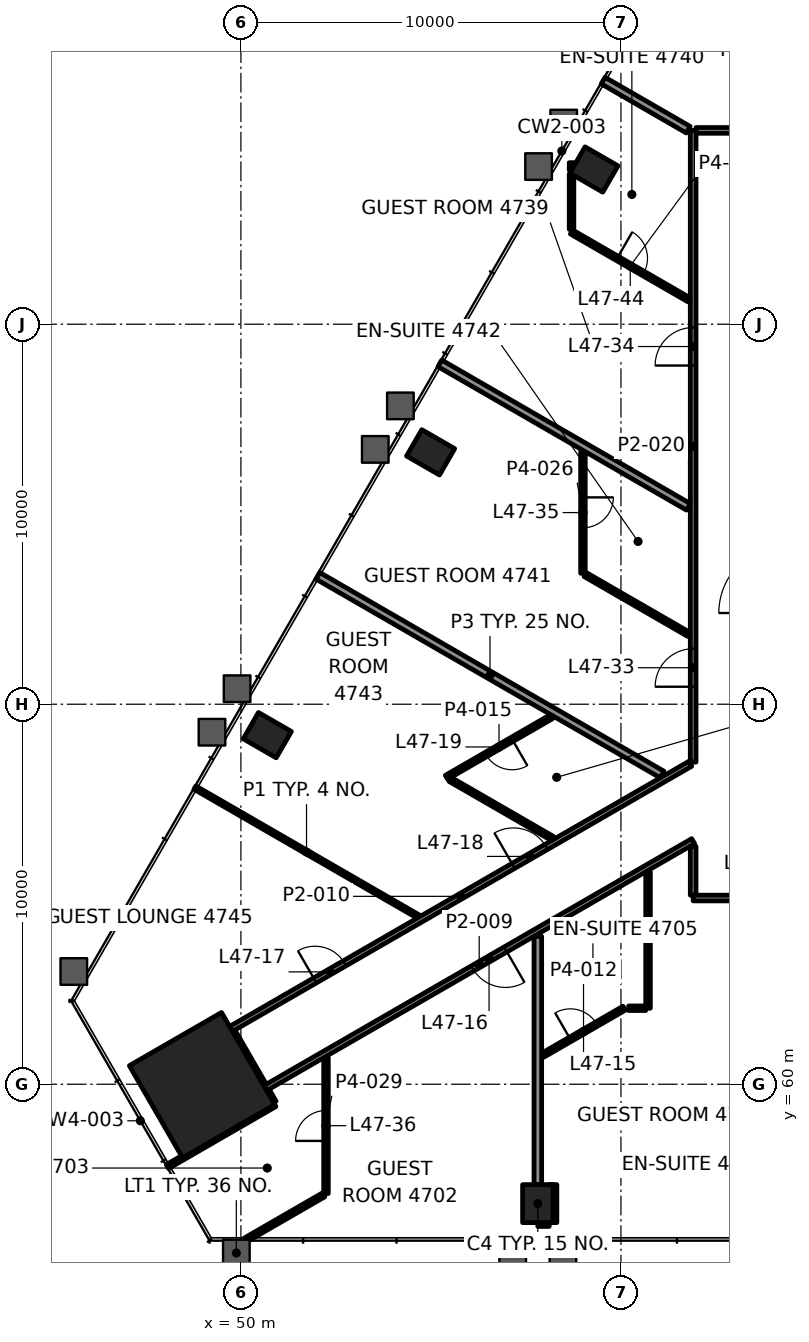
"""IFC4 building model, lengths in metres.
Left out: names, types, materials, properties, quantities, classifications, styles, units other than length and angle.
Written with IfcOpenShell. Run it as: python <this file> out.ifc"""

import sys

from ifc_helpers import new_model, si_unit, direction, frame, frame_2d, origin, origin_2d, place, context, subcontext, project, spatial, rectangle, hollow_rectangle, extrude, element, fill, save


model = new_model("IFC4")
c1 = context("Model", 3, precision=1e-05, world=origin(), true_north=direction((0.0, 1.0)))
c2 = subcontext(c1, "Body", "Model", "MODEL_VIEW")
j1 = project(units=[si_unit("LENGTHUNIT", "METRE"), si_unit("PLANEANGLEUNIT", "RADIAN")], contexts=[c1])
p1 = place(None, origin())
s1 = spatial("IfcSite", under=j1, at=p1, CompositionType="ELEMENT")
p2 = place(p1, origin())
s2 = spatial("IfcBuilding", under=s1, at=p2, CompositionType="ELEMENT")
p3 = place(p2, frame((0.0, 0.0, 202.6)))
s3 = spatial("IfcBuildingStorey", under=s2, at=p3, CompositionType="ELEMENT", Elevation=202.6)
p4 = place(p3, frame((48.978, 59.976, 0.0), z_axis=(0.0, 0.0, 1.0), x_axis=(0.5, -0.866025403784, 0.0)))
e1 = element("IfcColumn", 1, at=p4, inside=s3, PredefinedType="COLUMN", context=c2, shape_type="SweptSolid", body=[
    extrude(rectangle(XDim=2.8, YDim=2.8, at=origin_2d()), origin(), (0.0, 0.0, 1.0), 3.9),
])
for number, where, z_axis, x_axis in (
    (2, (57.812, 56.858, -0.0), (0.0, 0.0, 1.0), (1.0, 0.0, 0.0)),
    (3, (59.289, 84.071, -0.0), (0.0, 0.0, 1.0), (-0.5, -0.866, 0.0)),
    (4, (54.992, 76.628, -0.0), (0.0, 0.0, 1.0), (-0.5, -0.866, 0.0)),
    (5, (50.695, 69.186, -0.0), (0.0, 0.0, 1.0), (-0.5, -0.866, 0.0)),
):
    element("IfcColumn", number, at=place(p3, frame(where, z_axis=z_axis, x_axis=x_axis)), inside=s3, PredefinedType="COLUMN", context=c2, shape_type="SweptSolid", body=[
        extrude(hollow_rectangle(XDim=0.8, YDim=1.0, WallThickness=0.05, at=origin_2d()), origin(), (0.0, 0.0, 1.0), 3.9),
    ])
p5 = place(p3, frame((57.812, 56.358, 0.0), z_axis=(0.0, 0.0, 1.0), x_axis=(1.0, 0.0, 0.0)))
e6 = element("IfcWall", 6, at=p5, inside=s3, PredefinedType="PARTITIONING", context=c2, shape_type="SweptSolid", body=[
    extrude(rectangle(XDim=0.3, YDim=0.2, at=frame_2d((0.15, 0.0))), origin(), (0.0, 0.0, 1.0), 3.1),
])
p6 = place(p3, frame((60.203, 62.0, 0.0), z_axis=(0.0, 0.0, 1.0), x_axis=(1.0, 0.0, 0.0)))
e7 = element("IfcWall", 7, at=p6, inside=s3, PredefinedType="PARTITIONING", context=c2, shape_type="SweptSolid", body=[
    extrude(rectangle(XDim=0.449, YDim=0.12, at=frame_2d((0.225, 0.0))), origin(), (0.0, 0.0, 1.0), 3.1),
])
p7 = place(p3, frame((88.1, 64.9, 0.0), z_axis=(0.0, 0.0, 1.0), x_axis=(-1.0, 0.0, 0.0)))
e8 = element("IfcWall", 8, at=p7, inside=s3, PredefinedType="PARTITIONING", context=c2, shape_type="SweptSolid", body=[
    extrude(rectangle(XDim=26.2, YDim=0.15, at=frame_2d((13.1, 0.0))), origin(), (0.0, 0.0, 1.0), 3.1),
])
p8 = place(p7, frame((7.443, 0.0, 0.0)))
e9 = element("IfcOpeningElement", 9, at=p8, cuts=e8, PredefinedType="OPENING", context=c2, shape_type="SweptSolid", body=[
    extrude(rectangle(XDim=1.0, YDim=2.1, at=frame_2d((0.5, 1.05))), frame((0.0, 0.085, 0.0), z_axis=(0.0, -1.0, 0.0), x_axis=(1.0, 0.0, 0.0)), (0.0, 0.0, 1.0), 0.17),
])
p9 = place(p7, frame((16.037, 0.0, 0.0)))
e10 = element("IfcOpeningElement", 10, at=p9, cuts=e8, PredefinedType="OPENING", context=c2, shape_type="SweptSolid", body=[
    extrude(rectangle(XDim=1.0, YDim=2.1, at=frame_2d((0.5, 1.05))), frame((0.0, 0.085, 0.0), z_axis=(0.0, -1.0, 0.0), x_axis=(1.0, 0.0, 0.0)), (0.0, 0.0, 1.0), 0.17),
])
p10 = place(p7, frame((19.747, 0.0, 0.0)))
e11 = element("IfcOpeningElement", 11, at=p10, cuts=e8, PredefinedType="OPENING", context=c2, shape_type="SweptSolid", body=[
    extrude(rectangle(XDim=1.0, YDim=2.1, at=frame_2d((0.5, 1.05))), frame((0.0, 0.085, 0.0), z_axis=(0.0, -1.0, 0.0), x_axis=(1.0, 0.0, 0.0)), (0.0, 0.0, 1.0), 0.17),
])
p11 = place(p7, frame((24.013, 0.0, 0.0)))
e12 = element("IfcOpeningElement", 12, at=p11, cuts=e8, PredefinedType="OPENING", context=c2, shape_type="SweptSolid", body=[
    extrude(rectangle(XDim=1.0, YDim=2.1, at=frame_2d((0.5, 1.05))), frame((0.0, 0.085, 0.0), z_axis=(0.0, -1.0, 0.0), x_axis=(1.0, 0.0, 0.0)), (0.0, 0.0, 1.0), 0.17),
])
p12 = place(p3, frame((61.976, 85.1, 0.0), z_axis=(0.0, 0.0, 1.0), x_axis=(1.0, 0.0, 0.0)))
e13 = element("IfcWall", 13, at=p12, inside=s3, PredefinedType="PARTITIONING", context=c2, shape_type="SweptSolid", body=[
    extrude(rectangle(XDim=9.281, YDim=0.15, at=frame_2d((4.64, 0.0))), origin(), (0.0, 0.0, 1.0), 3.097),
])
p13 = place(p12, frame((6.899, 0.0, 0.0)))
e14 = element("IfcOpeningElement", 14, at=p13, cuts=e13, PredefinedType="OPENING", context=c2, shape_type="SweptSolid", body=[
    extrude(rectangle(XDim=1.0, YDim=2.1, at=frame_2d((0.5, 1.05))), frame((0.0, 0.085, 0.0), z_axis=(0.0, -1.0, 0.0), x_axis=(1.0, 0.0, 0.0)), (0.0, 0.0, 1.0), 0.17),
])
p14 = place(p3, frame((50.115, 55.898, 0.0), z_axis=(0.0, 0.0, 1.0), x_axis=(0.865977459579, 0.500083032607, 0.0)))
e15 = element("IfcWall", 15, at=p14, inside=s3, PredefinedType="PARTITIONING", context=c2, shape_type="SweptSolid", body=[
    extrude(rectangle(XDim=2.383, YDim=0.12, at=frame_2d((1.192, 0.0))), origin(), (0.0, 0.0, 1.0), 3.1),
])
p15 = place(p3, frame((57.947, 60.767, 0.0), z_axis=(0.0, 0.0, 1.0), x_axis=(0.866060325455, 0.499939509014, 0.0)))
e16 = element("IfcWall", 16, at=p15, inside=s3, PredefinedType="PARTITIONING", context=c2, shape_type="SweptSolid", body=[
    extrude(rectangle(XDim=2.467, YDim=0.12, at=frame_2d((1.233, 0.0))), origin(), (0.0, 0.0, 1.0), 3.1),
])
p16 = place(p15, frame((0.833, 0.0, 0.0)))
e17 = element("IfcOpeningElement", 17, at=p16, cuts=e16, PredefinedType="OPENING", context=c2, shape_type="SweptSolid", body=[
    extrude(rectangle(XDim=0.8, YDim=2.1, at=frame_2d((0.4, 1.05))), frame((0.0, 0.07, 0.0), z_axis=(0.0, -1.0, 0.0), x_axis=(1.0, 0.0, 0.0)), (0.0, 0.0, 1.0), 0.14),
])
p17 = place(p3, frame((48.067, 57.834, 0.0), z_axis=(0.0, 0.0, 1.0), x_axis=(0.866035906198, 0.499981808845, 0.0)))
e18 = element("IfcWall", 18, at=p17, inside=s3, PredefinedType="PARTITIONING", context=c2, shape_type="SweptSolid", body=[
    extrude(rectangle(XDim=3.259, YDim=0.12, at=frame_2d((1.63, 0.0))), origin(), (0.0, 0.0, 1.0), 3.1),
])
p18 = place(p3, frame((61.9, 66.397, 0.0), z_axis=(0.0, 0.0, 1.0), x_axis=(-0.866028610752, -0.499994445327, 0.0)))
e19 = element("IfcWall", 19, at=p18, inside=s3, PredefinedType="PARTITIONING", context=c2, shape_type="SweptSolid", body=[
    extrude(rectangle(XDim=13.002, YDim=0.15, at=frame_2d((6.501, 0.0))), origin(), (0.0, 0.0, 1.0), 2.947),
])
p19 = place(p18, frame((5.701, 0.0, 0.0)))
e20 = element("IfcOpeningElement", 20, at=p19, cuts=e19, PredefinedType="OPENING", context=c2, shape_type="SweptSolid", body=[
    extrude(rectangle(XDim=1.0, YDim=2.1, at=frame_2d((0.5, 1.05))), frame((0.0, 0.085, 0.0), z_axis=(0.0, -1.0, 0.0), x_axis=(1.0, 0.0, 0.0)), (0.0, 0.0, 1.0), 0.17),
])
p20 = place(p3, frame((49.74, 61.456, 0.0), z_axis=(0.0, 0.0, 1.0), x_axis=(0.866030582951, 0.499991029314, 0.0)))
e21 = element("IfcWall", 21, at=p20, inside=s3, PredefinedType="PARTITIONING", context=c2, shape_type="SweptSolid", body=[
    extrude(rectangle(XDim=13.954, YDim=0.15, at=frame_2d((6.977, 0.0))), origin(), (0.0, 0.0, 1.0), 3.1),
])
p21 = place(p20, frame((2.552, 0.0, 0.0)))
e22 = element("IfcOpeningElement", 22, at=p21, cuts=e21, PredefinedType="OPENING", context=c2, shape_type="SweptSolid", body=[
    extrude(rectangle(XDim=0.9, YDim=2.1, at=frame_2d((0.45, 1.05))), frame((0.0, 0.085, 0.0), z_axis=(0.0, -1.0, 0.0), x_axis=(1.0, 0.0, 0.0)), (0.0, 0.0, 1.0), 0.17),
])
p22 = place(p20, frame((8.579, 0.0, 0.0)))
e23 = element("IfcOpeningElement", 23, at=p22, cuts=e21, PredefinedType="OPENING", context=c2, shape_type="SweptSolid", body=[
    extrude(rectangle(XDim=1.0, YDim=2.1, at=frame_2d((0.5, 1.05))), frame((0.0, 0.085, 0.0), z_axis=(0.0, -1.0, 0.0), x_axis=(1.0, 0.0, 0.0)), (0.0, 0.0, 1.0), 0.17),
])
p23 = place(p3, frame((58.175, 69.674, 0.0), z_axis=(0.0, 0.0, 1.0), x_axis=(-0.866051923801, -0.49995406317, 0.0)))
e24 = element("IfcWall", 24, at=p23, inside=s3, PredefinedType="PARTITIONING", context=c2, shape_type="SweptSolid", body=[
    extrude(rectangle(XDim=3.194, YDim=0.12, at=frame_2d((1.597, 0.0))), origin(), (0.0, 0.0, 1.0), 3.1),
])
p24 = place(p23, frame((1.197, 0.0, 0.0)))
e25 = element("IfcOpeningElement", 25, at=p24, cuts=e24, PredefinedType="OPENING", context=c2, shape_type="SweptSolid", body=[
    extrude(rectangle(XDim=0.8, YDim=2.1, at=frame_2d((0.4, 1.05))), frame((0.0, 0.07, 0.0), z_axis=(0.0, -1.0, 0.0), x_axis=(1.0, 0.0, 0.0)), (0.0, 0.0, 1.0), 0.14),
])
p25 = place(p3, frame((61.9, 64.975, 0.0), z_axis=(0.0, 0.0, 1.0), x_axis=(0.0, 1.0, 0.0)))
e26 = element("IfcWall", 26, at=p25, inside=s3, PredefinedType="PARTITIONING", context=c2, shape_type="SweptSolid", body=[
    extrude(rectangle(XDim=1.286, YDim=0.15, at=frame_2d((0.643, 0.0))), origin(), (0.0, 0.0, 1.0), 2.947),
])
p26 = place(p3, frame((61.9, 68.476, 0.0), z_axis=(0.0, 0.0, 1.0), x_axis=(0.0, 1.0, 0.0)))
e27 = element("IfcWall", 27, at=p26, inside=s3, PredefinedType="PARTITIONING", context=c2, shape_type="SweptSolid", body=[
    extrude(rectangle(XDim=16.624, YDim=0.15, at=frame_2d((8.312, 0.0))), origin(), (0.0, 0.0, 1.0), 3.1),
])
p27 = place(p26, frame((1.984, 0.0, 0.0)))
e28 = element("IfcOpeningElement", 28, at=p27, cuts=e27, PredefinedType="OPENING", context=c2, shape_type="SweptSolid", body=[
    extrude(rectangle(XDim=1.0, YDim=2.1, at=frame_2d((0.5, 1.05))), frame((0.0, 0.085, 0.0), z_axis=(0.0, -1.0, 0.0), x_axis=(1.0, 0.0, 0.0)), (0.0, 0.0, 1.0), 0.17),
])
p28 = place(p26, frame((10.437, 0.0, 0.0)))
e29 = element("IfcOpeningElement", 29, at=p28, cuts=e27, PredefinedType="OPENING", context=c2, shape_type="SweptSolid", body=[
    extrude(rectangle(XDim=1.0, YDim=2.1, at=frame_2d((0.5, 1.05))), frame((0.0, 0.085, 0.0), z_axis=(0.0, -1.0, 0.0), x_axis=(1.0, 0.0, 0.0)), (0.0, 0.0, 1.0), 0.17),
])
p29 = place(p3, frame((60.713, 62.0, 0.0), z_axis=(0.0, 0.0, 1.0), x_axis=(0.0, 1.0, 0.0)))
e30 = element("IfcWall", 30, at=p29, inside=s3, PredefinedType="PARTITIONING", context=c2, shape_type="SweptSolid", body=[
    extrude(rectangle(XDim=3.585, YDim=0.12, at=frame_2d((1.793, 0.0))), origin(), (0.0, 0.0, 1.0), 2.947),
])
p30 = place(p3, frame((59.0, 76.64, 0.0), z_axis=(0.0, 0.0, 1.0), x_axis=(0.0, -1.0, 0.0)))
e31 = element("IfcWall", 31, at=p30, inside=s3, PredefinedType="PARTITIONING", context=c2, shape_type="SweptSolid", body=[
    extrude(rectangle(XDim=3.194, YDim=0.12, at=frame_2d((1.597, 0.0))), origin(), (0.0, 0.0, 1.0), 3.1),
])
p31 = place(p30, frame((1.197, 0.0, 0.0)))
e32 = element("IfcOpeningElement", 32, at=p31, cuts=e31, PredefinedType="OPENING", context=c2, shape_type="SweptSolid", body=[
    extrude(rectangle(XDim=0.8, YDim=2.1, at=frame_2d((0.4, 1.05))), frame((0.0, 0.07, 0.0), z_axis=(0.0, -1.0, 0.0), x_axis=(1.0, 0.0, 0.0)), (0.0, 0.0, 1.0), 0.14),
])
p32 = place(p3, frame((58.7, 82.495, 0.0), z_axis=(0.0, 0.0, 1.0), x_axis=(0.0, 1.0, 0.0)))
e33 = element("IfcWall", 33, at=p32, inside=s3, PredefinedType="PARTITIONING", context=c2, shape_type="SweptSolid", body=[
    extrude(rectangle(XDim=1.453, YDim=0.12, at=frame_2d((0.727, 0.0))), origin(), (0.0, 0.0, 1.0), 3.022),
])
p33 = place(p3, frame((58.7, 84.051, 0.0), z_axis=(0.0, 0.0, 1.0), x_axis=(0.0, 1.0, 0.0)))
e34 = element("IfcWall", 34, at=p33, inside=s3, PredefinedType="PARTITIONING", context=c2, shape_type="SweptSolid", body=[
    extrude(rectangle(XDim=0.2, YDim=0.12, at=frame_2d((0.1, 0.0))), origin(), (0.0, 0.0, 1.0), 3.1),
])
p34 = place(p3, frame((58.213, 56.358, 0.0), z_axis=(0.0, 0.0, 1.0), x_axis=(0.0, 1.0, 0.0)))
e35 = element("IfcWall", 35, at=p34, inside=s3, PredefinedType="PARTITIONING", context=c2, shape_type="SweptSolid", body=[
    extrude(rectangle(XDim=1.0, YDim=0.2, at=frame_2d((0.5, 0.0))), origin(), (0.0, 0.0, 1.0), 3.022),
])
p35 = place(p3, frame((57.813, 57.358, 0.0), z_axis=(0.0, 0.0, 1.0), x_axis=(0.0, 1.0, 0.0)))
e36 = element("IfcWall", 36, at=p35, inside=s3, PredefinedType="PARTITIONING", context=c2, shape_type="SweptSolid", body=[
    extrude(rectangle(XDim=6.532, YDim=0.2, at=frame_2d((3.266, 0.0))), origin(), (0.0, 0.0, 1.0), 3.1),
])
p36 = place(p3, frame((52.239, 57.125, 0.0), z_axis=(0.0, 0.0, 1.0), x_axis=(0.0, 1.0, 0.0)))
e37 = element("IfcWall", 37, at=p36, inside=s3, PredefinedType="PARTITIONING", context=c2, shape_type="SweptSolid", body=[
    extrude(rectangle(XDim=3.569, YDim=0.12, at=frame_2d((1.784, 0.0))), origin(), (0.0, 0.0, 1.0), 3.1),
])
p37 = place(p36, frame((1.384, 0.0, 0.0)))
e38 = element("IfcOpeningElement", 38, at=p37, cuts=e37, PredefinedType="OPENING", context=c2, shape_type="SweptSolid", body=[
    extrude(rectangle(XDim=0.8, YDim=2.1, at=frame_2d((0.4, 1.05))), frame((0.0, 0.07, 0.0), z_axis=(0.0, -1.0, 0.0), x_axis=(1.0, 0.0, 0.0)), (0.0, 0.0, 1.0), 0.14),
])
p38 = place(p3, frame((50.86, 59.516, 0.0), z_axis=(0.0, 0.0, 1.0), x_axis=(-0.499741784413, 0.866174433305, 0.0)))
e39 = element("IfcWall", 39, at=p38, inside=s3, PredefinedType="PARTITIONING", context=c2, shape_type="SweptSolid", body=[
    extrude(rectangle(XDim=0.365, YDim=0.15, at=frame_2d((0.182, 0.0))), origin(), (0.0, 0.0, 1.0), 3.1),
])
p39 = place(p3, frame((61.77, 85.119, 0.0), z_axis=(0.0, 0.0, 1.0), x_axis=(-0.866055039205, 0.499948666432, 0.0)))
e40 = element("IfcWall", 40, at=p39, inside=s3, PredefinedType="PARTITIONING", context=c2, shape_type="SweptSolid", body=[
    extrude(rectangle(XDim=2.585, YDim=0.2, at=frame_2d((1.292, 0.0))), origin(), (0.0, 0.0, 1.0), 3.022),
])
p40 = place(p3, frame((58.7, 82.426, 0.0), z_axis=(0.0, 0.0, 1.0), x_axis=(0.866028357664, -0.499994883695, 0.0)))
e41 = element("IfcWall", 41, at=p40, inside=s3, PredefinedType="PARTITIONING", context=c2, shape_type="SweptSolid", body=[
    extrude(rectangle(XDim=3.568, YDim=0.12, at=frame_2d((1.784, 0.0))), origin(), (0.0, 0.0, 1.0), 3.1),
])
p41 = place(p40, frame((1.384, 0.0, 0.0)))
e42 = element("IfcOpeningElement", 42, at=p41, cuts=e41, PredefinedType="OPENING", context=c2, shape_type="SweptSolid", body=[
    extrude(rectangle(XDim=0.8, YDim=2.1, at=frame_2d((0.4, 1.05))), frame((0.0, 0.07, 0.0), z_axis=(0.0, -1.0, 0.0), x_axis=(1.0, 0.0, 0.0)), (0.0, 0.0, 1.0), 0.14),
])
p42 = place(p3, frame((61.773, 75.195, 0.0), z_axis=(0.0, 0.0, 1.0), x_axis=(-0.866025649656, 0.499999574138, 0.0)))
e43 = element("IfcWall", 43, at=p42, inside=s3, PredefinedType="PARTITIONING", context=c2, shape_type="SweptSolid", body=[
    extrude(rectangle(XDim=7.55, YDim=0.2, at=frame_2d((3.775, 0.0))), origin(), (0.0, 0.0, 1.0), 3.022),
])
p43 = place(p3, frame((61.79, 71.835, 0.0), z_axis=(0.0, 0.0, 1.0), x_axis=(-0.866028267601, 0.499995039691, 0.0)))
e44 = element("IfcWall", 44, at=p43, inside=s3, PredefinedType="PARTITIONING", context=c2, shape_type="SweptSolid", body=[
    extrude(rectangle(XDim=3.153, YDim=0.12, at=frame_2d((1.576, 0.0))), origin(), (0.0, 0.0, 1.0), 3.1),
])
p44 = place(p3, frame((61.082, 68.15, 0.0), z_axis=(0.0, 0.0, 1.0), x_axis=(-0.866026174012, 0.499998665924, 0.0)))
e45 = element("IfcWall", 45, at=p44, inside=s3, PredefinedType="PARTITIONING", context=c2, shape_type="SweptSolid", body=[
    extrude(rectangle(XDim=10.457, YDim=0.2, at=frame_2d((5.228, 0.0))), origin(), (0.0, 0.0, 1.0), 3.022),
])
p45 = place(p3, frame((58.199, 66.466, 0.0), z_axis=(0.0, 0.0, 1.0), x_axis=(-0.866028856698, 0.499994019331, 0.0)))
e46 = element("IfcWall", 46, at=p45, inside=s3, PredefinedType="PARTITIONING", context=c2, shape_type="SweptSolid", body=[
    extrude(rectangle(XDim=3.113, YDim=0.12, at=frame_2d((1.556, 0.0))), origin(), (0.0, 0.0, 1.0), 3.1),
])
p46 = place(p3, frame((54.663, 64.414, 0.0), z_axis=(0.0, 0.0, 1.0), x_axis=(-0.866023732449, 0.500002894826, 0.0)))
e47 = element("IfcWall", 47, at=p46, inside=s3, PredefinedType="PARTITIONING", context=c2, shape_type="SweptSolid", body=[
    extrude(rectangle(XDim=6.782, YDim=0.1, at=frame_2d((3.391, 0.0))), origin(), (0.0, 0.0, 1.0), 3.1),
])
p47 = place(p3, frame((50.603, 59.962, 0.0), z_axis=(0.0, 0.0, 1.0), x_axis=(-0.499991515992, 0.866030301974, 0.0)))
e48 = element("IfcWall", 48, at=p47, inside=s3, PredefinedType="PARTITIONING", context=c2, shape_type="SweptSolid", body=[
    extrude(rectangle(XDim=1.649, YDim=0.15, at=frame_2d((0.825, 0.0))), origin(), (0.0, 0.0, 1.0), 2.947),
])
p48 = place(p16, origin())
e49 = element("IfcDoor", 49, at=p48, inside=s3, OperationType="SINGLE_SWING_RIGHT", PredefinedType="DOOR", context=c2, shape_type="SweptSolid", body=[
    extrude(rectangle(XDim=0.8, YDim=2.1, at=frame_2d((0.4, 1.05))), frame((0.0, 0.025, 0.0), z_axis=(0.0, -1.0, 0.0), x_axis=(1.0, 0.0, 0.0)), (0.0, 0.0, 1.0), 0.05),
])
fill(e17, e49)
p49 = place(p19, origin())
e50 = element("IfcDoor", 50, at=p49, inside=s3, OperationType="SINGLE_SWING_RIGHT", PredefinedType="DOOR", context=c2, shape_type="SweptSolid", body=[
    extrude(rectangle(XDim=1.0, YDim=2.1, at=frame_2d((0.5, 1.05))), frame((0.0, 0.025, 0.0), z_axis=(0.0, -1.0, 0.0), x_axis=(1.0, 0.0, 0.0)), (0.0, 0.0, 1.0), 0.05),
])
fill(e20, e50)
p50 = place(p21, origin())
e51 = element("IfcDoor", 51, at=p50, inside=s3, OperationType="SINGLE_SWING_RIGHT", PredefinedType="DOOR", context=c2, shape_type="SweptSolid", body=[
    extrude(rectangle(XDim=0.9, YDim=2.1, at=frame_2d((0.45, 1.05))), frame((0.0, 0.025, 0.0), z_axis=(0.0, -1.0, 0.0), x_axis=(1.0, 0.0, 0.0)), (0.0, 0.0, 1.0), 0.05),
])
fill(e22, e51)
p51 = place(p22, origin())
e52 = element("IfcDoor", 52, at=p51, inside=s3, OperationType="SINGLE_SWING_RIGHT", PredefinedType="DOOR", context=c2, shape_type="SweptSolid", body=[
    extrude(rectangle(XDim=1.0, YDim=2.1, at=frame_2d((0.5, 1.05))), frame((0.0, 0.025, 0.0), z_axis=(0.0, -1.0, 0.0), x_axis=(1.0, 0.0, 0.0)), (0.0, 0.0, 1.0), 0.05),
])
fill(e23, e52)
p52 = place(p24, origin())
e53 = element("IfcDoor", 53, at=p52, inside=s3, OperationType="SINGLE_SWING_RIGHT", PredefinedType="DOOR", context=c2, shape_type="SweptSolid", body=[
    extrude(rectangle(XDim=0.8, YDim=2.1, at=frame_2d((0.4, 1.05))), frame((0.0, 0.025, 0.0), z_axis=(0.0, -1.0, 0.0), x_axis=(1.0, 0.0, 0.0)), (0.0, 0.0, 1.0), 0.05),
])
fill(e25, e53)
p53 = place(p27, origin())
e54 = element("IfcDoor", 54, at=p53, inside=s3, OperationType="SINGLE_SWING_RIGHT", PredefinedType="DOOR", context=c2, shape_type="SweptSolid", body=[
    extrude(rectangle(XDim=1.0, YDim=2.1, at=frame_2d((0.5, 1.05))), frame((0.0, 0.025, 0.0), z_axis=(0.0, -1.0, 0.0), x_axis=(1.0, 0.0, 0.0)), (0.0, 0.0, 1.0), 0.05),
])
fill(e28, e54)
p54 = place(p28, origin())
e55 = element("IfcDoor", 55, at=p54, inside=s3, OperationType="SINGLE_SWING_RIGHT", PredefinedType="DOOR", context=c2, shape_type="SweptSolid", body=[
    extrude(rectangle(XDim=1.0, YDim=2.1, at=frame_2d((0.5, 1.05))), frame((0.0, 0.025, 0.0), z_axis=(0.0, -1.0, 0.0), x_axis=(1.0, 0.0, 0.0)), (0.0, 0.0, 1.0), 0.05),
])
fill(e29, e55)
p55 = place(p31, origin())
e56 = element("IfcDoor", 56, at=p55, inside=s3, OperationType="SINGLE_SWING_RIGHT", PredefinedType="DOOR", context=c2, shape_type="SweptSolid", body=[
    extrude(rectangle(XDim=0.8, YDim=2.1, at=frame_2d((0.4, 1.05))), frame((0.0, 0.025, 0.0), z_axis=(0.0, -1.0, 0.0), x_axis=(1.0, 0.0, 0.0)), (0.0, 0.0, 1.0), 0.05),
])
fill(e32, e56)
p56 = place(p37, origin())
e57 = element("IfcDoor", 57, at=p56, inside=s3, OperationType="SINGLE_SWING_RIGHT", PredefinedType="DOOR", context=c2, shape_type="SweptSolid", body=[
    extrude(rectangle(XDim=0.8, YDim=2.1, at=frame_2d((0.4, 1.05))), frame((0.0, 0.025, 0.0), z_axis=(0.0, -1.0, 0.0), x_axis=(1.0, 0.0, 0.0)), (0.0, 0.0, 1.0), 0.05),
])
fill(e38, e57)
p57 = place(p41, origin())
e58 = element("IfcDoor", 58, at=p57, inside=s3, OperationType="SINGLE_SWING_RIGHT", PredefinedType="DOOR", context=c2, shape_type="SweptSolid", body=[
    extrude(rectangle(XDim=0.8, YDim=2.1, at=frame_2d((0.4, 1.05))), frame((0.0, 0.025, 0.0), z_axis=(0.0, -1.0, 0.0), x_axis=(1.0, 0.0, 0.0)), (0.0, 0.0, 1.0), 0.05),
])
fill(e42, e58)
p58 = place(p3, origin())
p59 = place(p58, frame((52.085, 55.883, 0.15), z_axis=(0.0, 0.0, 1.0), x_axis=(1.0, 0.0, 0.0)))
p60 = place(p59, origin())
e59 = element("IfcWindow", 59, at=p60, inside=s3, PartitioningType="SINGLE_PANEL", PredefinedType="WINDOW", context=c2, shape_type="SweptSolid", body=[
    extrude(rectangle(XDim=2.789, YDim=3.55, at=frame_2d((1.395, 1.775))), frame((0.0, 0.03, 0.0), z_axis=(0.0, -1.0, 0.0), x_axis=(1.0, 0.0, 0.0)), (0.0, 0.0, 1.0), 0.06),
])
p61 = place(p58, frame((52.686, 74.584, 0.15), z_axis=(0.0, 0.0, 1.0), x_axis=(-0.5, -0.866025, 0.0)))
p62 = place(p61, origin())
e60 = element("IfcWindow", 60, at=p62, inside=s3, PartitioningType="SINGLE_PANEL", PredefinedType="WINDOW", context=c2, shape_type="SweptSolid", body=[
    extrude(rectangle(XDim=2.789, YDim=3.55, at=frame_2d((1.395, 1.775))), frame((0.0, 0.03, 0.0), z_axis=(0.0, -1.0, 0.0), x_axis=(1.0, 0.0, 0.0)), (0.0, 0.0, 1.0), 0.06),
])
save(model, sys.argv[1])
